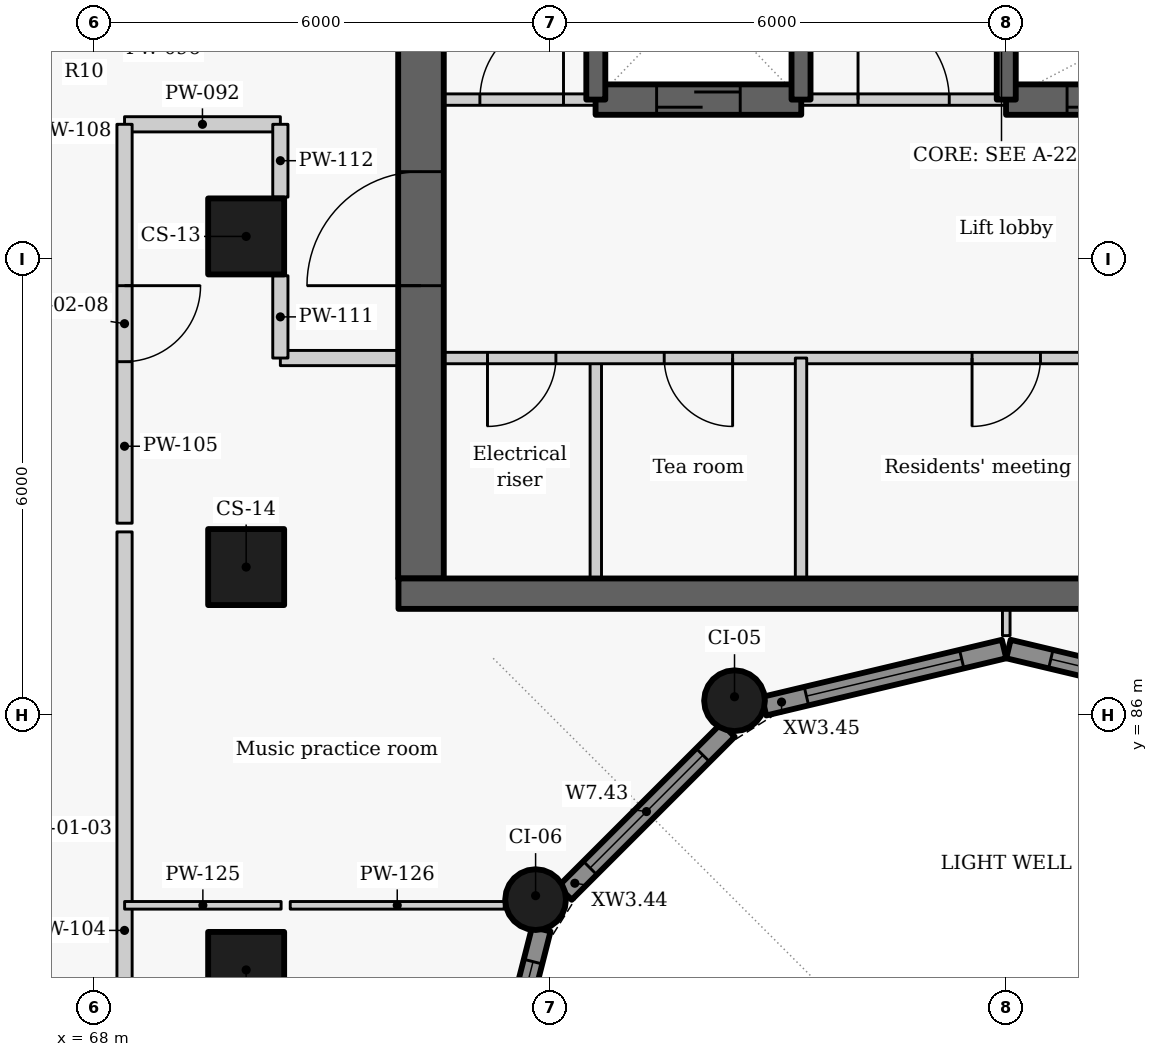
"""IFC4 building model, lengths in metres.
Left out: names, types, materials, properties, quantities, classifications, styles, units other than length and angle.
Written with IfcOpenShell. Run it as: python <this file> out.ifc"""

import sys

from ifc_helpers import new_model, si_unit, direction, frame, frame_2d, origin, origin_2d, place, context, subcontext, project, spatial, rectangle, circle, extrude, element, fill, save


model = new_model("IFC4")
c1 = context("Model", 3, precision=1e-05, world=origin(), true_north=direction((0.0, 1.0)))
c2 = subcontext(c1, "Body", "Model", "MODEL_VIEW")
j1 = project(units=[si_unit("LENGTHUNIT", "METRE"), si_unit("PLANEANGLEUNIT", "RADIAN")], contexts=[c1])
p1 = place(None, origin())
s1 = spatial("IfcSite", under=j1, at=p1, CompositionType="ELEMENT")
p2 = place(p1, origin())
s2 = spatial("IfcBuilding", under=s1, at=p2, CompositionType="ELEMENT")
p3 = place(p2, frame((0.0, 0.0, 140.4)))
s3 = spatial("IfcBuildingStorey", under=s2, at=p3, CompositionType="ELEMENT", Elevation=140.4)
for number, where, z_axis, x_axis in (
    (1, (70.0, 92.3, 0.0), (0.0, 0.0, 1.0), (0.0, -1.0, 0.0)),
    (2, (70.0, 87.95, 0.0), (0.0, 0.0, 1.0), (0.0, -1.0, 0.0)),
    (3, (70.0, 82.65, 0.0), (0.0, 0.0, 1.0), (0.0, -1.0, 0.0)),
):
    element("IfcColumn", number, at=place(p3, frame(where, z_axis=z_axis, x_axis=x_axis)), inside=s3, PredefinedType="COLUMN", context=c2, shape_type="SweptSolid", body=[
        extrude(rectangle(XDim=1.0, YDim=1.0, at=origin_2d()), origin(), (0.0, 0.0, 1.0), 3.3),
    ])
for number, where, z_axis, x_axis in (
    (4, (76.425, 86.192, 0.0), (0.0, 0.0, 1.0), (-0.866, -0.5, 0.0)),
    (5, (73.808, 83.575, 0.0), (0.0, 0.0, 1.0), (-0.5, -0.866, 0.0)),
):
    element("IfcColumn", number, at=place(p3, frame(where, z_axis=z_axis, x_axis=x_axis)), inside=s3, PredefinedType="COLUMN", context=c2, shape_type="SweptSolid", body=[
        extrude(circle(Radius=0.4, at=origin_2d()), origin(), (0.0, 0.0, 1.0), 3.3),
    ])
p4 = place(p3, frame((73.14, 80.27, 0.0), z_axis=(0.0, 0.0, 1.0), x_axis=(0.247055971283, 0.969001211069, 0.0)))
e6 = element("IfcWall", 6, at=p4, inside=s3, PredefinedType="SOLIDWALL", context=c2, shape_type="SweptSolid", body=[
    extrude(rectangle(XDim=3.01, YDim=0.25, at=frame_2d((1.505, 0.0))), origin(), (0.0, 0.0, 1.0), 2.425),
])
p5 = place(p4, frame((0.469, 0.0, 0.9)))
e7 = element("IfcOpeningElement", 7, at=p5, cuts=e6, PredefinedType="OPENING", context=c2, shape_type="SweptSolid", body=[
    extrude(rectangle(XDim=2.1, YDim=1.1, at=frame_2d((1.05, 0.55))), frame((0.0, 0.135, 0.0), z_axis=(0.0, -1.0, 0.0), x_axis=(1.0, 0.0, 0.0)), (0.0, 0.0, 1.0), 0.27),
])
p6 = place(p3, frame((74.194, 83.661, 0.0), z_axis=(0.0, 0.0, 1.0), x_axis=(0.707106781187, 0.707106781187, 0.0)))
e8 = element("IfcWall", 8, at=p6, inside=s3, PredefinedType="SOLIDWALL", context=c2, shape_type="SweptSolid", body=[
    extrude(rectangle(XDim=3.033, YDim=0.25, at=frame_2d((1.517, 0.0))), origin(), (0.0, 0.0, 1.0), 2.425),
])
p7 = place(p6, frame((0.467, 0.0, 0.9)))
e9 = element("IfcOpeningElement", 9, at=p7, cuts=e8, PredefinedType="OPENING", context=c2, shape_type="SweptSolid", body=[
    extrude(rectangle(XDim=2.1, YDim=1.1, at=frame_2d((1.05, 0.55))), frame((0.0, 0.135, 0.0), z_axis=(0.0, -1.0, 0.0), x_axis=(1.0, 0.0, 0.0)), (0.0, 0.0, 1.0), 0.27),
])
p8 = place(p3, frame((76.814, 86.119, 0.0), z_axis=(0.0, 0.0, 1.0), x_axis=(0.972773113459, 0.231759508395, 0.0)))
e10 = element("IfcWall", 10, at=p8, inside=s3, PredefinedType="SOLIDWALL", context=c2, shape_type="SweptSolid", body=[
    extrude(rectangle(XDim=3.246, YDim=0.25, at=frame_2d((1.623, 0.0))), origin(), (0.0, 0.0, 1.0), 2.425),
])
p9 = place(p8, frame((0.573, 0.0, 0.9)))
e11 = element("IfcOpeningElement", 11, at=p9, cuts=e10, PredefinedType="OPENING", context=c2, shape_type="SweptSolid", body=[
    extrude(rectangle(XDim=2.1, YDim=1.1, at=frame_2d((1.05, 0.55))), frame((0.0, 0.135, 0.0), z_axis=(0.0, -1.0, 0.0), x_axis=(1.0, 0.0, 0.0)), (0.0, 0.0, 1.0), 0.27),
])
p10 = place(p3, frame((80.029, 86.872, 0.0), z_axis=(0.0, 0.0, 1.0), x_axis=(0.972773113459, -0.231759508395, 0.0)))
e12 = element("IfcWall", 12, at=p10, inside=s3, PredefinedType="SOLIDWALL", context=c2, shape_type="SweptSolid", body=[
    extrude(rectangle(XDim=3.246, YDim=0.25, at=frame_2d((1.623, 0.0))), origin(), (0.0, 0.0, 1.0), 2.425),
])
p11 = place(p10, frame((0.573, 0.0, 0.9)))
e13 = element("IfcOpeningElement", 13, at=p11, cuts=e12, PredefinedType="OPENING", context=c2, shape_type="SweptSolid", body=[
    extrude(rectangle(XDim=2.1, YDim=1.1, at=frame_2d((1.05, 0.55))), frame((0.0, 0.135, 0.0), z_axis=(0.0, -1.0, 0.0), x_axis=(1.0, 0.0, 0.0)), (0.0, 0.0, 1.0), 0.27),
])
p12 = place(p3, frame((74.6, 87.8, 0.0), z_axis=(0.0, 0.0, 1.0), x_axis=(0.0, 1.0, 0.0)))
e14 = element("IfcWall", 14, at=p12, inside=s3, PredefinedType="PARTITIONING", context=c2, shape_type="SweptSolid", body=[
    extrude(rectangle(XDim=2.9, YDim=0.15, at=frame_2d((1.45, 0.0))), origin(), (0.0, 0.0, 1.0), 3.025),
])
p13 = place(p3, frame((85.4, 90.7, 0.0), z_axis=(0.0, 0.0, 1.0), x_axis=(-1.0, 0.0, 0.0)))
e15 = element("IfcWall", 15, at=p13, inside=s3, PredefinedType="PARTITIONING", context=c2, shape_type="SweptSolid", body=[
    extrude(rectangle(XDim=13.4, YDim=0.15, at=frame_2d((6.7, 0.0))), origin(), (0.0, 0.0, 1.0), 3.025),
])
p14 = place(p13, frame((11.325, 0.0, 0.0)))
e16 = element("IfcOpeningElement", 16, at=p14, cuts=e15, PredefinedType="OPENING", context=c2, shape_type="SweptSolid", body=[
    extrude(rectangle(XDim=0.9, YDim=2.1, at=frame_2d((0.45, 1.05))), frame((0.0, 0.085, 0.0), z_axis=(0.0, -1.0, 0.0), x_axis=(1.0, 0.0, 0.0)), (0.0, 0.0, 1.0), 0.17),
])
p15 = place(p13, frame((9.0, 0.0, 0.0)))
e17 = element("IfcOpeningElement", 17, at=p15, cuts=e15, PredefinedType="OPENING", context=c2, shape_type="SweptSolid", body=[
    extrude(rectangle(XDim=0.9, YDim=2.1, at=frame_2d((0.45, 1.05))), frame((0.0, 0.085, 0.0), z_axis=(0.0, -1.0, 0.0), x_axis=(1.0, 0.0, 0.0)), (0.0, 0.0, 1.0), 0.17),
])
p16 = place(p13, frame((4.95, 0.0, 0.0)))
e18 = element("IfcOpeningElement", 18, at=p16, cuts=e15, PredefinedType="OPENING", context=c2, shape_type="SweptSolid", body=[
    extrude(rectangle(XDim=0.9, YDim=2.1, at=frame_2d((0.45, 1.05))), frame((0.0, 0.085, 0.0), z_axis=(0.0, -1.0, 0.0), x_axis=(1.0, 0.0, 0.0)), (0.0, 0.0, 1.0), 0.17),
])
p17 = place(p13, frame((0.9, 0.0, 0.0)))
e19 = element("IfcOpeningElement", 19, at=p17, cuts=e15, PredefinedType="OPENING", context=c2, shape_type="SweptSolid", body=[
    extrude(rectangle(XDim=0.9, YDim=2.1, at=frame_2d((0.45, 1.05))), frame((0.0, 0.085, 0.0), z_axis=(0.0, -1.0, 0.0), x_axis=(1.0, 0.0, 0.0)), (0.0, 0.0, 1.0), 0.17),
])
p18 = place(p3, frame((72.3, 87.8, -0.275), z_axis=(0.0, 0.0, 1.0), x_axis=(0.0, 1.0, 0.0)))
e20 = element("IfcWall", 20, at=p18, inside=s3, PredefinedType="SHEAR", context=c2, shape_type="SweptSolid", body=[
    extrude(rectangle(XDim=9.1, YDim=0.6, at=frame_2d((4.55, 0.0))), origin(), (0.0, 0.0, 1.0), 3.3),
])
p19 = place(p18, frame((3.852, 0.0, 0.275)))
e21 = element("IfcOpeningElement", 21, at=p19, cuts=e20, PredefinedType="OPENING", context=c2, shape_type="SweptSolid", body=[
    extrude(rectangle(XDim=1.5, YDim=2.1, at=frame_2d((0.75, 1.05))), frame((0.0, 0.31, 0.0), z_axis=(0.0, -1.0, 0.0), x_axis=(1.0, 0.0, 0.0)), (0.0, 0.0, 1.0), 0.62),
])
p20 = place(p3, frame((77.3, 87.8, 0.0), z_axis=(0.0, 0.0, 1.0), x_axis=(0.0, 1.0, 0.0)))
e22 = element("IfcWall", 22, at=p20, inside=s3, PredefinedType="PARTITIONING", context=c2, shape_type="SweptSolid", body=[
    extrude(rectangle(XDim=2.9, YDim=0.15, at=frame_2d((1.45, 0.0))), origin(), (0.0, 0.0, 1.0), 3.025),
])
p21 = place(p3, frame((72.0, 94.1, 0.0), z_axis=(0.0, 0.0, 1.0), x_axis=(1.0, 0.0, 0.0)))
e23 = element("IfcWall", 23, at=p21, inside=s3, PredefinedType="PARTITIONING", context=c2, shape_type="SweptSolid", body=[
    extrude(rectangle(XDim=2.603, YDim=0.15, at=frame_2d((1.302, 0.0))), origin(), (0.0, 0.0, 1.0), 3.025),
])
p22 = place(p21, frame((1.075, 0.0, 0.0)))
e24 = element("IfcOpeningElement", 24, at=p22, cuts=e23, PredefinedType="OPENING", context=c2, shape_type="SweptSolid", body=[
    extrude(rectangle(XDim=1.1, YDim=2.1, at=frame_2d((0.55, 1.05))), frame((0.0, 0.085, 0.0), z_axis=(0.0, -1.0, 0.0), x_axis=(1.0, 0.0, 0.0)), (0.0, 0.0, 1.0), 0.17),
])
p23 = place(p3, frame((77.297, 94.1, 0.0), z_axis=(0.0, 0.0, 1.0), x_axis=(1.0, 0.0, 0.0)))
e25 = element("IfcWall", 25, at=p23, inside=s3, PredefinedType="PARTITIONING", context=c2, shape_type="SweptSolid", body=[
    extrude(rectangle(XDim=2.706, YDim=0.15, at=frame_2d((1.353, 0.0))), origin(), (0.0, 0.0, 1.0), 3.025),
])
p24 = place(p23, frame((0.753, 0.0, 0.0)))
e26 = element("IfcOpeningElement", 26, at=p24, cuts=e25, PredefinedType="OPENING", context=c2, shape_type="SweptSolid", body=[
    extrude(rectangle(XDim=1.2, YDim=2.1, at=frame_2d((0.6, 1.05))), frame((0.0, 0.085, 0.0), z_axis=(0.0, -1.0, 0.0), x_axis=(1.0, 0.0, 0.0)), (0.0, 0.0, 1.0), 0.17),
])
p25 = place(p3, frame((74.597, 94.1, -0.275), z_axis=(0.0, 0.0, 1.0), x_axis=(1.0, 0.0, 0.0)))
e27 = element("IfcWall", 27, at=p25, inside=s3, PredefinedType="SHEAR", context=c2, shape_type="SweptSolid", body=[
    extrude(rectangle(XDim=2.706, YDim=0.4, at=frame_2d((1.353, 0.0))), origin(), (0.0, 0.0, 1.0), 3.3),
])
p26 = place(p25, frame((0.803, 0.0, 0.275)))
e28 = element("IfcOpeningElement", 28, at=p26, cuts=e27, PredefinedType="OPENING", context=c2, shape_type="SweptSolid", body=[
    extrude(rectangle(XDim=1.1, YDim=2.1, at=frame_2d((0.55, 1.05))), frame((0.0, 0.21, 0.0), z_axis=(0.0, -1.0, 0.0), x_axis=(1.0, 0.0, 0.0)), (0.0, 0.0, 1.0), 0.42),
])
p27 = place(p3, frame((79.997, 94.1, -0.275), z_axis=(0.0, 0.0, 1.0), x_axis=(1.0, 0.0, 0.0)))
e29 = element("IfcWall", 29, at=p27, inside=s3, PredefinedType="SHEAR", context=c2, shape_type="SweptSolid", body=[
    extrude(rectangle(XDim=5.406, YDim=0.4, at=frame_2d((2.703, 0.0))), origin(), (0.0, 0.0, 1.0), 3.3),
])
p28 = place(p27, frame((0.803, 0.0, 0.275)))
e30 = element("IfcOpeningElement", 30, at=p28, cuts=e29, PredefinedType="OPENING", context=c2, shape_type="SweptSolid", body=[
    extrude(rectangle(XDim=1.1, YDim=2.1, at=frame_2d((0.55, 1.05))), frame((0.0, 0.21, 0.0), z_axis=(0.0, -1.0, 0.0), x_axis=(1.0, 0.0, 0.0)), (0.0, 0.0, 1.0), 0.42),
])
for number, where, z_axis, x_axis in (
    (31, (74.6, 94.1, -0.275), (0.0, 0.0, 1.0), (0.0, 1.0, 0.0)),
    (32, (77.3, 94.1, -0.275), (0.0, 0.0, 1.0), (0.0, 1.0, 0.0)),
    (33, (80.0, 94.1, -0.275), (0.0, 0.0, 1.0), (0.0, 1.0, 0.0)),
):
    element("IfcWall", number, at=place(p3, frame(where, z_axis=z_axis, x_axis=x_axis)), inside=s3, PredefinedType="SHEAR", context=c2, shape_type="SweptSolid", body=[
        extrude(rectangle(XDim=2.8, YDim=0.25, at=frame_2d((1.4, 0.0))), origin(), (0.0, 0.0, 1.0), 3.3),
    ])
p29 = place(p3, frame((68.4, 93.775, 0.0), z_axis=(0.0, 0.0, 1.0), x_axis=(1.0, 0.0, 0.0)))
e34 = element("IfcWall", 34, at=p29, inside=s3, PredefinedType="PARTITIONING", context=c2, shape_type="SweptSolid", body=[
    extrude(rectangle(XDim=2.05, YDim=0.2, at=frame_2d((1.025, 0.0))), origin(), (0.0, 0.0, 1.0), 2.505),
])
p30 = place(p3, frame((70.45, 90.7, 0.0), z_axis=(0.0, 0.0, 1.0), x_axis=(1.0, 0.0, 0.0)))
e35 = element("IfcWall", 35, at=p30, inside=s3, PredefinedType="PARTITIONING", context=c2, shape_type="SweptSolid", body=[
    extrude(rectangle(XDim=1.55, YDim=0.2, at=frame_2d((0.775, 0.0))), origin(), (0.0, 0.0, 1.0), 3.025),
])
p31 = place(p3, frame((68.4, 77.927, 0.0), z_axis=(0.0, 0.0, 1.0), x_axis=(0.0, 1.0, 0.0)))
e36 = element("IfcWall", 36, at=p31, inside=s3, PredefinedType="PARTITIONING", context=c2, shape_type="SweptSolid", body=[
    extrude(rectangle(XDim=10.486, YDim=0.2, at=frame_2d((5.243, 0.0))), origin(), (0.0, 0.0, 1.0), 3.025),
])
p32 = place(p3, frame((68.4, 93.775, 0.0), z_axis=(0.0, 0.0, 1.0), x_axis=(0.0, -1.0, 0.0)))
e37 = element("IfcWall", 37, at=p32, inside=s3, PredefinedType="PARTITIONING", context=c2, shape_type="SweptSolid", body=[
    extrude(rectangle(XDim=5.248, YDim=0.2, at=frame_2d((2.624, 0.0))), origin(), (0.0, 0.0, 1.0), 3.025),
])
p33 = place(p32, frame((2.123, 0.0, 0.0)))
e38 = element("IfcOpeningElement", 38, at=p33, cuts=e37, PredefinedType="OPENING", context=c2, shape_type="SweptSolid", body=[
    extrude(rectangle(XDim=1.0, YDim=2.1, at=frame_2d((0.5, 1.05))), frame((0.0, 0.11, 0.0), z_axis=(0.0, -1.0, 0.0), x_axis=(1.0, 0.0, 0.0)), (0.0, 0.0, 1.0), 0.22),
])
p34 = place(p3, frame((70.45, 90.7, 0.0), z_axis=(0.0, 0.0, 1.0), x_axis=(0.0, 1.0, 0.0)))
e39 = element("IfcWall", 39, at=p34, inside=s3, PredefinedType="PARTITIONING", context=c2, shape_type="SweptSolid", body=[
    extrude(rectangle(XDim=1.083, YDim=0.2, at=frame_2d((0.542, 0.0))), origin(), (0.0, 0.0, 1.0), 3.025),
])
p35 = place(p3, frame((70.45, 92.817, 0.0), z_axis=(0.0, 0.0, 1.0), x_axis=(0.0, 1.0, 0.0)))
e40 = element("IfcWall", 40, at=p35, inside=s3, PredefinedType="PARTITIONING", context=c2, shape_type="SweptSolid", body=[
    extrude(rectangle(XDim=0.958, YDim=0.2, at=frame_2d((0.479, 0.0))), origin(), (0.0, 0.0, 1.0), 3.025),
])
p36 = place(p3, frame((80.0, 87.048, 0.0), z_axis=(0.0, 0.0, 1.0), x_axis=(0.0, 1.0, 0.0)))
e41 = element("IfcWall", 41, at=p36, inside=s3, PredefinedType="PARTITIONING", context=c2, shape_type="SweptSolid", body=[
    extrude(rectangle(XDim=0.352, YDim=0.1, at=frame_2d((0.176, 0.0))), origin(), (0.0, 0.0, 1.0), 3.025),
])
p37 = place(p3, frame((68.401, 83.5, 0.0), z_axis=(0.0, 0.0, 1.0), x_axis=(1.0, 0.0, 0.0)))
e42 = element("IfcWall", 42, at=p37, inside=s3, PredefinedType="PARTITIONING", context=c2, shape_type="SweptSolid", body=[
    extrude(rectangle(XDim=2.059, YDim=0.1, at=frame_2d((1.03, 0.0))), origin(), (0.0, 0.0, 1.0), 2.505),
])
p38 = place(p3, frame((70.58, 83.5, 0.0), z_axis=(0.0, 0.0, 1.0), x_axis=(1.0, 0.0, 0.0)))
e43 = element("IfcWall", 43, at=p38, inside=s3, PredefinedType="PARTITIONING", context=c2, shape_type="SweptSolid", body=[
    extrude(rectangle(XDim=2.815, YDim=0.1, at=frame_2d((1.408, 0.0))), origin(), (0.0, 0.0, 1.0), 3.025),
])
p39 = place(p3, frame((72.004, 87.6, -0.275), z_axis=(0.0, 0.0, 1.0), x_axis=(1.0, 0.0, 0.0)))
e44 = element("IfcWall", 44, at=p39, inside=s3, PredefinedType="SHEAR", context=c2, shape_type="SweptSolid", body=[
    extrude(rectangle(XDim=15.992, YDim=0.4, at=frame_2d((7.996, 0.0))), origin(), (0.0, 0.0, 1.0), 3.3),
])
p40 = place(p5, origin())
e45 = element("IfcWindow", 45, at=p40, inside=s3, PartitioningType="SINGLE_PANEL", PredefinedType="WINDOW", context=c2, shape_type="SweptSolid", body=[
    extrude(rectangle(XDim=2.1, YDim=1.1, at=frame_2d((1.05, 0.55))), frame((0.0, 0.03, 0.0), z_axis=(0.0, -1.0, 0.0), x_axis=(1.0, 0.0, 0.0)), (0.0, 0.0, 1.0), 0.06),
])
fill(e7, e45)
p41 = place(p7, origin())
e46 = element("IfcWindow", 46, at=p41, inside=s3, PartitioningType="SINGLE_PANEL", PredefinedType="WINDOW", context=c2, shape_type="SweptSolid", body=[
    extrude(rectangle(XDim=2.1, YDim=1.1, at=frame_2d((1.05, 0.55))), frame((0.0, 0.03, 0.0), z_axis=(0.0, -1.0, 0.0), x_axis=(1.0, 0.0, 0.0)), (0.0, 0.0, 1.0), 0.06),
])
fill(e9, e46)
p42 = place(p9, origin())
e47 = element("IfcWindow", 47, at=p42, inside=s3, PartitioningType="SINGLE_PANEL", PredefinedType="WINDOW", context=c2, shape_type="SweptSolid", body=[
    extrude(rectangle(XDim=2.1, YDim=1.1, at=frame_2d((1.05, 0.55))), frame((0.0, 0.03, 0.0), z_axis=(0.0, -1.0, 0.0), x_axis=(1.0, 0.0, 0.0)), (0.0, 0.0, 1.0), 0.06),
])
fill(e11, e47)
p43 = place(p11, origin())
e48 = element("IfcWindow", 48, at=p43, inside=s3, PartitioningType="SINGLE_PANEL", PredefinedType="WINDOW", context=c2, shape_type="SweptSolid", body=[
    extrude(rectangle(XDim=2.1, YDim=1.1, at=frame_2d((1.05, 0.55))), frame((0.0, 0.03, 0.0), z_axis=(0.0, -1.0, 0.0), x_axis=(1.0, 0.0, 0.0)), (0.0, 0.0, 1.0), 0.06),
])
fill(e13, e48)
p44 = place(p14, origin())
e49 = element("IfcDoor", 49, at=p44, inside=s3, OperationType="SINGLE_SWING_RIGHT", PredefinedType="DOOR", context=c2, shape_type="SweptSolid", body=[
    extrude(rectangle(XDim=0.9, YDim=2.1, at=frame_2d((0.45, 1.05))), frame((0.0, 0.025, 0.0), z_axis=(0.0, -1.0, 0.0), x_axis=(1.0, 0.0, 0.0)), (0.0, 0.0, 1.0), 0.05),
])
fill(e16, e49)
p45 = place(p15, origin())
e50 = element("IfcDoor", 50, at=p45, inside=s3, OperationType="SINGLE_SWING_LEFT", PredefinedType="DOOR", context=c2, shape_type="SweptSolid", body=[
    extrude(rectangle(XDim=0.9, YDim=2.1, at=frame_2d((0.45, 1.05))), frame((0.0, 0.025, 0.0), z_axis=(0.0, -1.0, 0.0), x_axis=(1.0, 0.0, 0.0)), (0.0, 0.0, 1.0), 0.05),
])
fill(e17, e50)
p46 = place(p16, origin())
e51 = element("IfcDoor", 51, at=p46, inside=s3, OperationType="SINGLE_SWING_RIGHT", PredefinedType="DOOR", context=c2, shape_type="SweptSolid", body=[
    extrude(rectangle(XDim=0.9, YDim=2.1, at=frame_2d((0.45, 1.05))), frame((0.0, 0.025, 0.0), z_axis=(0.0, -1.0, 0.0), x_axis=(1.0, 0.0, 0.0)), (0.0, 0.0, 1.0), 0.05),
])
fill(e18, e51)
p47 = place(p22, origin())
e52 = element("IfcDoor", 52, at=p47, inside=s3, OperationType="SINGLE_SWING_RIGHT", PredefinedType="DOOR", context=c2, shape_type="SweptSolid", body=[
    extrude(rectangle(XDim=1.1, YDim=2.1, at=frame_2d((0.55, 1.05))), frame((0.0, 0.025, 0.0), z_axis=(0.0, -1.0, 0.0), x_axis=(1.0, 0.0, 0.0)), (0.0, 0.0, 1.0), 0.05),
])
fill(e24, e52)
p48 = place(p26, origin())
e53 = element("IfcDoor", 53, at=p48, inside=s3, OperationType="SLIDING_TO_LEFT", PredefinedType="DOOR", context=c2, shape_type="SweptSolid", body=[
    extrude(rectangle(XDim=1.1, YDim=2.1, at=frame_2d((0.55, 1.05))), frame((0.0, 0.025, 0.0), z_axis=(0.0, -1.0, 0.0), x_axis=(1.0, 0.0, 0.0)), (0.0, 0.0, 1.0), 0.05),
])
fill(e28, e53)
p49 = place(p24, origin())
e54 = element("IfcDoor", 54, at=p49, inside=s3, OperationType="DOUBLE_DOOR_SINGLE_SWING", PredefinedType="DOOR", context=c2, shape_type="SweptSolid", body=[
    extrude(rectangle(XDim=1.2, YDim=2.1, at=frame_2d((0.6, 1.05))), frame((0.0, 0.025, 0.0), z_axis=(0.0, -1.0, 0.0), x_axis=(1.0, 0.0, 0.0)), (0.0, 0.0, 1.0), 0.05),
])
fill(e26, e54)
p50 = place(p28, origin())
e55 = element("IfcDoor", 55, at=p50, inside=s3, OperationType="SLIDING_TO_LEFT", PredefinedType="DOOR", context=c2, shape_type="SweptSolid", body=[
    extrude(rectangle(XDim=1.1, YDim=2.1, at=frame_2d((0.55, 1.05))), frame((0.0, 0.025, 0.0), z_axis=(0.0, -1.0, 0.0), x_axis=(1.0, 0.0, 0.0)), (0.0, 0.0, 1.0), 0.05),
])
fill(e30, e55)
p51 = place(p33, origin())
e56 = element("IfcDoor", 56, at=p51, inside=s3, OperationType="SINGLE_SWING_LEFT", PredefinedType="DOOR", context=c2, shape_type="SweptSolid", body=[
    extrude(rectangle(XDim=1.0, YDim=2.1, at=frame_2d((0.5, 1.05))), frame((0.0, 0.025, 0.0), z_axis=(0.0, -1.0, 0.0), x_axis=(1.0, 0.0, 0.0)), (0.0, 0.0, 1.0), 0.05),
])
fill(e38, e56)
p52 = place(p19, origin())
e57 = element("IfcDoor", 57, at=p52, inside=s3, OperationType="DOUBLE_DOOR_SINGLE_SWING", PredefinedType="DOOR", context=c2, shape_type="SweptSolid", body=[
    extrude(rectangle(XDim=1.5, YDim=2.1, at=frame_2d((0.75, 1.05))), frame((0.0, 0.025, 0.0), z_axis=(0.0, -1.0, 0.0), x_axis=(1.0, 0.0, 0.0)), (0.0, 0.0, 1.0), 0.05),
])
fill(e21, e57)
save(model, sys.argv[1])
